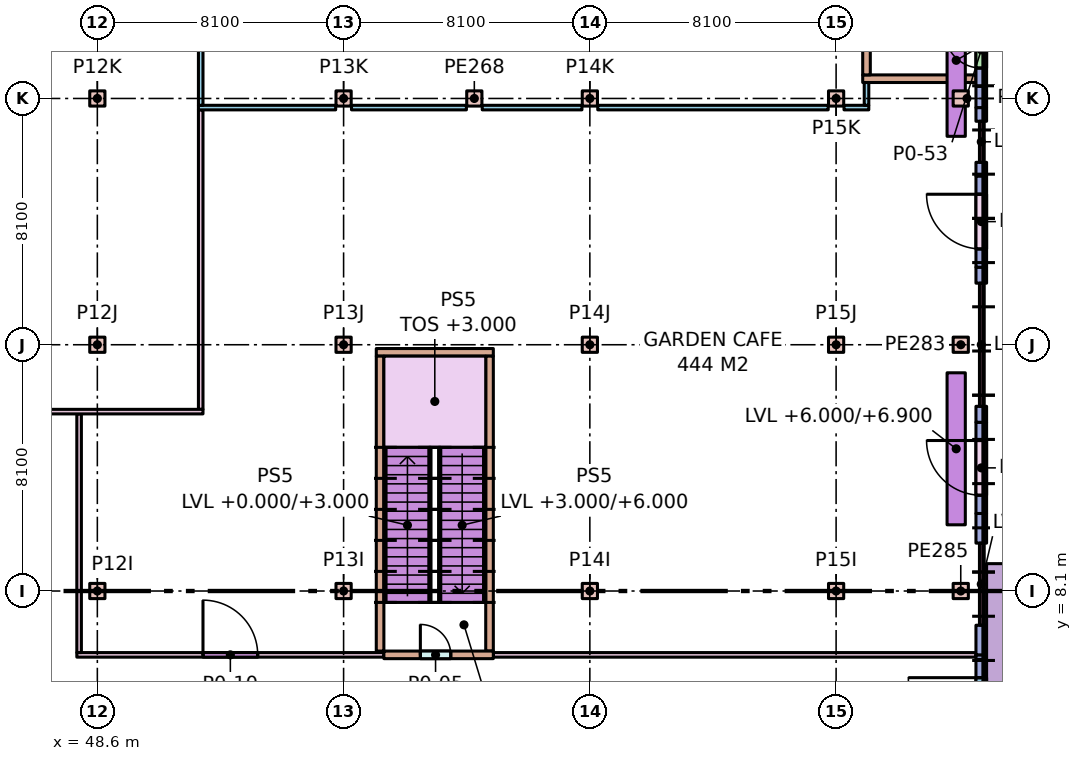
"""IFC4 building model, lengths in metres.
Left out: names, types, materials, properties, quantities, classifications, styles, units other than length and angle.
Written with IfcOpenShell. Run it as: python <this file> out.ifc"""

import sys

from ifc_helpers import new_model, si_unit, direction, frame, frame_2d, origin, origin_2d, place, context, subcontext, project, spatial, rectangle, extrude, element, fill, save


model = new_model("IFC4")
c1 = context("Model", 3, precision=1e-05, world=origin(), true_north=direction((0.0, 1.0)))
c2 = subcontext(c1, "Body", "Model", "MODEL_VIEW")
j1 = project(units=[si_unit("LENGTHUNIT", "METRE"), si_unit("PLANEANGLEUNIT", "RADIAN")], contexts=[c1])
p1 = place(None, origin())
s1 = spatial("IfcSite", under=j1, at=p1, CompositionType="ELEMENT")
p2 = place(p1, origin())
s2 = spatial("IfcBuilding", under=s1, at=p2, CompositionType="ELEMENT")
p3 = place(p2, origin())
s3 = spatial("IfcBuildingStorey", under=s2, at=p3, CompositionType="ELEMENT", Elevation=0.0)
for number, where, z_axis, x_axis in (
    (1, (48.6, 8.1, 0.0), (0.0, 0.0, 1.0), (1.0, 0.0, 0.0)),
    (2, (48.6, 16.2, 0.0), (0.0, 0.0, 1.0), (1.0, 0.0, 0.0)),
    (3, (48.6, 24.3, 0.0), (0.0, 0.0, 1.0), (1.0, 0.0, 0.0)),
    (4, (56.7, 8.1, 0.0), (0.0, 0.0, 1.0), (1.0, 0.0, 0.0)),
    (5, (56.7, 16.2, 0.0), (0.0, 0.0, 1.0), (1.0, 0.0, 0.0)),
    (6, (56.7, 24.3, 0.0), (0.0, 0.0, 1.0), (1.0, 0.0, 0.0)),
    (7, (64.8, 8.1, 0.0), (0.0, 0.0, 1.0), (1.0, 0.0, 0.0)),
    (8, (64.8, 16.2, 0.0), (0.0, 0.0, 1.0), (1.0, 0.0, 0.0)),
    (9, (64.8, 24.3, 0.0), (0.0, 0.0, 1.0), (1.0, 0.0, 0.0)),
    (10, (72.9, 8.1, 0.0), (0.0, 0.0, 1.0), (1.0, 0.0, 0.0)),
    (11, (72.9, 16.2, 0.0), (0.0, 0.0, 1.0), (1.0, 0.0, 0.0)),
    (12, (72.9, 24.3, 0.0), (0.0, 0.0, 1.0), (1.0, 0.0, 0.0)),
    (13, (61.0, 24.3, 0.0), (0.0, 0.0, 1.0), (1.0, 0.0, 0.0)),
    (14, (77.0, 16.2, 0.0), (0.0, 0.0, 1.0), (1.0, 0.0, 0.0)),
    (15, (77.0, 24.3, 0.0), (0.0, 0.0, 1.0), (1.0, 0.0, 0.0)),
    (16, (77.0, 8.1, 0.0), (0.0, 0.0, 1.0), (1.0, 0.0, 0.0)),
):
    element("IfcColumn", number, at=place(p3, frame(where, z_axis=z_axis, x_axis=x_axis)), inside=s3, PredefinedType="COLUMN", context=c2, shape_type="SweptSolid", body=[
        extrude(rectangle(XDim=0.5, YDim=0.5, at=origin_2d()), origin(), (0.0, 0.0, 1.0), 6.0),
    ])
p4 = place(p3, frame((77.675, 2.25, 0.0), z_axis=(0.0, 0.0, 1.0), x_axis=(0.0, 1.0, 0.0)))
e17 = element("IfcWall", 17, at=p4, inside=s3, PredefinedType="STANDARD", context=c2, shape_type="SweptSolid", body=[
    extrude(rectangle(XDim=3.6, YDim=0.35, at=frame_2d((1.8, 0.0))), origin(), (0.0, 0.0, 1.0), 5.68),
])
p5 = place(p4, frame((0.6, 0.0, 0.0)))
e18 = element("IfcOpeningElement", 18, at=p5, cuts=e17, PredefinedType="OPENING", context=c2, shape_type="SweptSolid", body=[
    extrude(rectangle(XDim=2.4, YDim=2.7, at=frame_2d((1.2, 1.35))), frame((0.0, 0.185, 0.0), z_axis=(0.0, -1.0, 0.0), x_axis=(1.0, 0.0, 0.0)), (0.0, 0.0, 1.0), 0.37),
])
p6 = place(p3, frame((77.675, 5.85, 0.0), z_axis=(0.0, 0.0, 1.0), x_axis=(0.0, 1.0, 0.0)))
e19 = element("IfcWall", 19, at=p6, inside=s3, PredefinedType="STANDARD", context=c2, shape_type="SweptSolid", body=[
    extrude(rectangle(XDim=0.15, YDim=0.35, at=frame_2d((0.075, 0.0))), origin(), (0.0, 0.0, 1.0), 5.68),
])
p7 = place(p3, frame((77.675, 6.0, 0.0), z_axis=(0.0, 0.0, 1.0), x_axis=(0.0, 1.0, 0.0)))
e20 = element("IfcWall", 20, at=p7, inside=s3, PredefinedType="STANDARD", context=c2, shape_type="SweptSolid", body=[
    extrude(rectangle(XDim=0.975, YDim=0.35, at=frame_2d((0.488, 0.0))), origin(), (0.0, 0.0, 1.0), 5.68),
])
p8 = place(p3, frame((77.675, 9.675, 0.0), z_axis=(0.0, 0.0, 1.0), x_axis=(0.0, 1.0, 0.0)))
e21 = element("IfcWall", 21, at=p8, inside=s3, PredefinedType="STANDARD", context=c2, shape_type="SweptSolid", body=[
    extrude(rectangle(XDim=0.975, YDim=0.35, at=frame_2d((0.487, 0.0))), origin(), (0.0, 0.0, 1.0), 5.68),
])
p9 = place(p3, frame((77.675, 10.65, 0.0), z_axis=(0.0, 0.0, 1.0), x_axis=(0.0, 1.0, 0.0)))
e22 = element("IfcWall", 22, at=p9, inside=s3, PredefinedType="STANDARD", context=c2, shape_type="SweptSolid", body=[
    extrude(rectangle(XDim=3.0, YDim=0.35, at=frame_2d((1.5, 0.0))), origin(), (0.0, 0.0, 1.0), 5.68),
])
p10 = place(p9, frame((0.6, 0.0, 0.0)))
e23 = element("IfcOpeningElement", 23, at=p10, cuts=e22, PredefinedType="OPENING", context=c2, shape_type="SweptSolid", body=[
    extrude(rectangle(XDim=1.8, YDim=2.7, at=frame_2d((0.9, 1.35))), frame((0.0, 0.185, 0.0), z_axis=(0.0, -1.0, 0.0), x_axis=(1.0, 0.0, 0.0)), (0.0, 0.0, 1.0), 0.37),
])
p11 = place(p3, frame((77.675, 13.65, 0.0), z_axis=(0.0, 0.0, 1.0), x_axis=(0.0, 1.0, 0.0)))
e24 = element("IfcWall", 24, at=p11, inside=s3, PredefinedType="STANDARD", context=c2, shape_type="SweptSolid", body=[
    extrude(rectangle(XDim=0.525, YDim=0.35, at=frame_2d((0.263, 0.0))), origin(), (0.0, 0.0, 1.0), 5.68),
])
p12 = place(p3, frame((77.675, 18.225, 0.0), z_axis=(0.0, 0.0, 1.0), x_axis=(0.0, 1.0, 0.0)))
e25 = element("IfcWall", 25, at=p12, inside=s3, PredefinedType="STANDARD", context=c2, shape_type="SweptSolid", body=[
    extrude(rectangle(XDim=0.525, YDim=0.35, at=frame_2d((0.262, 0.0))), origin(), (0.0, 0.0, 1.0), 5.68),
])
p13 = place(p3, frame((77.675, 18.75, 0.0), z_axis=(0.0, 0.0, 1.0), x_axis=(0.0, 1.0, 0.0)))
e26 = element("IfcWall", 26, at=p13, inside=s3, PredefinedType="STANDARD", context=c2, shape_type="SweptSolid", body=[
    extrude(rectangle(XDim=3.0, YDim=0.35, at=frame_2d((1.5, 0.0))), origin(), (0.0, 0.0, 1.0), 5.68),
])
p14 = place(p13, frame((0.6, 0.0, 0.0)))
e27 = element("IfcOpeningElement", 27, at=p14, cuts=e26, PredefinedType="OPENING", context=c2, shape_type="SweptSolid", body=[
    extrude(rectangle(XDim=1.8, YDim=2.7, at=frame_2d((0.9, 1.35))), frame((0.0, 0.185, 0.0), z_axis=(0.0, -1.0, 0.0), x_axis=(1.0, 0.0, 0.0)), (0.0, 0.0, 1.0), 0.37),
])
for number, where, z_axis, x_axis in (
    (28, (77.675, 21.75, 0.0), (0.0, 0.0, 1.0), (0.0, 1.0, 0.0)),
    (29, (77.675, 23.55, 0.0), (0.0, 0.0, 1.0), (0.0, 1.0, 0.0)),
):
    element("IfcWall", number, at=place(p3, frame(where, z_axis=z_axis, x_axis=x_axis)), inside=s3, PredefinedType="STANDARD", context=c2, shape_type="SweptSolid", body=[
        extrude(rectangle(XDim=0.45, YDim=0.35, at=frame_2d((0.225, 0.0))), origin(), (0.0, 0.0, 1.0), 5.68),
    ])
p15 = place(p3, frame((77.675, 24.0, 0.0), z_axis=(0.0, 0.0, 1.0), x_axis=(0.0, 1.0, 0.0)))
e30 = element("IfcWall", 30, at=p15, inside=s3, PredefinedType="STANDARD", context=c2, shape_type="SweptSolid", body=[
    extrude(rectangle(XDim=0.7, YDim=0.35, at=frame_2d((0.35, 0.0))), origin(), (0.0, 0.0, 1.0), 5.68),
])
p16 = place(p3, frame((77.675, 24.7, 0.0), z_axis=(0.0, 0.0, 1.0), x_axis=(0.0, 1.0, 0.0)))
e31 = element("IfcWall", 31, at=p16, inside=s3, PredefinedType="STANDARD", context=c2, shape_type="SweptSolid", body=[
    extrude(rectangle(XDim=2.4, YDim=0.35, at=frame_2d((1.2, 0.0))), origin(), (0.0, 0.0, 1.0), 5.68),
])
p17 = place(p16, frame((0.6, 0.0, 0.0)))
e32 = element("IfcOpeningElement", 32, at=p17, cuts=e31, PredefinedType="OPENING", context=c2, shape_type="SweptSolid", body=[
    extrude(rectangle(XDim=1.2, YDim=2.4, at=frame_2d((0.6, 1.2))), frame((0.0, 0.185, 0.0), z_axis=(0.0, -1.0, 0.0), x_axis=(1.0, 0.0, 0.0)), (0.0, 0.0, 1.0), 0.37),
])
for number, where, z_axis, x_axis in (
    (33, (76.85, 10.277, 6.0), (0.0, 0.0, 1.0), (0.0, 1.0, 0.0)),
    (34, (76.85, 23.055, 6.0), (0.0, 0.0, 1.0), (0.0, 1.0, 0.0)),
):
    element("IfcWall", number, at=place(p3, frame(where, z_axis=z_axis, x_axis=x_axis)), inside=s3, PredefinedType="PARAPET", context=c2, shape_type="SweptSolid", body=[
        extrude(rectangle(XDim=5.0, YDim=0.6, at=frame_2d((2.5, 0.0))), origin(), (0.0, 0.0, 1.0), 0.9),
    ])
p18 = place(p3, frame((73.775, 24.95, 0.0), z_axis=(0.0, 0.0, 1.0), x_axis=(1.0, 0.0, 0.0)))
e35 = element("IfcWall", 35, at=p18, inside=s3, PredefinedType="STANDARD", context=c2, shape_type="SweptSolid", body=[
    extrude(rectangle(XDim=3.725, YDim=0.25, at=frame_2d((1.863, 0.0))), origin(), (0.0, 0.0, 1.0), 5.68),
])
p19 = place(p3, frame((73.9, 25.075, 0.0), z_axis=(0.0, 0.0, 1.0), x_axis=(0.0, 1.0, 0.0)))
e36 = element("IfcWall", 36, at=p19, inside=s3, PredefinedType="STANDARD", context=c2, shape_type="SweptSolid", body=[
    extrude(rectangle(XDim=6.55, YDim=0.25, at=frame_2d((3.275, 0.0))), origin(), (0.0, 0.0, 1.0), 5.68),
])
p20 = place(p3, frame((51.925, 24.0, 0.0), z_axis=(0.0, 0.0, 1.0), x_axis=(1.0, 0.0, 0.0)))
e37 = element("IfcWall", 37, at=p20, inside=s3, PredefinedType="PARTITIONING", context=c2, shape_type="SweptSolid", body=[
    extrude(rectangle(XDim=4.515, YDim=0.15, at=frame_2d((2.257, 0.0))), origin(), (0.0, 0.0, 1.0), 5.68),
])
p21 = place(p3, frame((56.96, 24.0, 0.0), z_axis=(0.0, 0.0, 1.0), x_axis=(1.0, 0.0, 0.0)))
e38 = element("IfcWall", 38, at=p21, inside=s3, PredefinedType="PARTITIONING", context=c2, shape_type="SweptSolid", body=[
    extrude(rectangle(XDim=3.78, YDim=0.15, at=frame_2d((1.89, 0.0))), origin(), (0.0, 0.0, 1.0), 5.68),
])
p22 = place(p3, frame((61.26, 24.0, 0.0), z_axis=(0.0, 0.0, 1.0), x_axis=(1.0, 0.0, 0.0)))
e39 = element("IfcWall", 39, at=p22, inside=s3, PredefinedType="PARTITIONING", context=c2, shape_type="SweptSolid", body=[
    extrude(rectangle(XDim=3.28, YDim=0.15, at=frame_2d((1.64, 0.0))), origin(), (0.0, 0.0, 1.0), 5.68),
])
p23 = place(p3, frame((65.06, 24.0, 0.0), z_axis=(0.0, 0.0, 1.0), x_axis=(1.0, 0.0, 0.0)))
e40 = element("IfcWall", 40, at=p23, inside=s3, PredefinedType="PARTITIONING", context=c2, shape_type="SweptSolid", body=[
    extrude(rectangle(XDim=7.58, YDim=0.15, at=frame_2d((3.79, 0.0))), origin(), (0.0, 0.0, 1.0), 5.68),
])
p24 = place(p3, frame((73.16, 24.0, 0.0), z_axis=(0.0, 0.0, 1.0), x_axis=(1.0, 0.0, 0.0)))
e41 = element("IfcWall", 41, at=p24, inside=s3, PredefinedType="PARTITIONING", context=c2, shape_type="SweptSolid", body=[
    extrude(rectangle(XDim=0.815, YDim=0.15, at=frame_2d((0.408, 0.0))), origin(), (0.0, 0.0, 1.0), 5.68),
])
p25 = place(p3, frame((73.9, 24.075, 0.0), z_axis=(0.0, 0.0, 1.0), x_axis=(0.0, 1.0, 0.0)))
e42 = element("IfcWall", 42, at=p25, inside=s3, PredefinedType="PARTITIONING", context=c2, shape_type="SweptSolid", body=[
    extrude(rectangle(XDim=0.75, YDim=0.15, at=frame_2d((0.375, 0.0))), origin(), (0.0, 0.0, 1.0), 5.68),
])
p26 = place(p3, frame((47.925, 6.0, 0.0), z_axis=(0.0, 0.0, 1.0), x_axis=(1.0, 0.0, 0.0)))
e43 = element("IfcWall", 43, at=p26, inside=s3, PredefinedType="PARTITIONING", context=c2, shape_type="SweptSolid", body=[
    extrude(rectangle(XDim=10.1, YDim=0.15, at=frame_2d((5.05, 0.0))), origin(), (0.0, 0.0, 1.0), 5.68),
])
p27 = place(p26, frame((4.15, 0.0, 0.0)))
e44 = element("IfcOpeningElement", 44, at=p27, cuts=e43, PredefinedType="OPENING", context=c2, shape_type="SweptSolid", body=[
    extrude(rectangle(XDim=1.8, YDim=2.4, at=frame_2d((0.9, 1.2))), frame((0.0, 0.085, 0.0), z_axis=(0.0, -1.0, 0.0), x_axis=(1.0, 0.0, 0.0)), (0.0, 0.0, 1.0), 0.17),
])
p28 = place(p3, frame((61.625, 6.0, 0.0), z_axis=(0.0, 0.0, 1.0), x_axis=(1.0, 0.0, 0.0)))
e45 = element("IfcWall", 45, at=p28, inside=s3, PredefinedType="PARTITIONING", context=c2, shape_type="SweptSolid", body=[
    extrude(rectangle(XDim=15.875, YDim=0.15, at=frame_2d((7.938, 0.0))), origin(), (0.0, 0.0, 1.0), 5.68),
])
p29 = place(p3, frame((52.0, 14.075, 0.0), z_axis=(0.0, 0.0, 1.0), x_axis=(0.0, 1.0, 0.0)))
e46 = element("IfcWall", 46, at=p29, inside=s3, PredefinedType="PARTITIONING", context=c2, shape_type="SweptSolid", body=[
    extrude(rectangle(XDim=9.85, YDim=0.15, at=frame_2d((4.925, 0.0))), origin(), (0.0, 0.0, 1.0), 5.68),
])
p30 = place(p3, frame((48.0, 6.075, 0.0), z_axis=(0.0, 0.0, 1.0), x_axis=(0.0, 1.0, 0.0)))
e47 = element("IfcWall", 47, at=p30, inside=s3, PredefinedType="PARTITIONING", context=c2, shape_type="SweptSolid", body=[
    extrude(rectangle(XDim=7.85, YDim=0.15, at=frame_2d((3.925, 0.0))), origin(), (0.0, 0.0, 1.0), 5.68),
])
p31 = place(p3, frame((57.775, 15.95, 0.0), z_axis=(0.0, 0.0, 1.0), x_axis=(1.0, 0.0, 0.0)))
e48 = element("IfcWall", 48, at=p31, inside=s3, PredefinedType="STANDARD", context=c2, shape_type="SweptSolid", body=[
    extrude(rectangle(XDim=3.85, YDim=0.25, at=frame_2d((1.925, 0.0))), origin(), (0.0, 0.0, 1.0), 5.68),
])
for number, where, z_axis, x_axis in (
    (49, (57.9, 6.125, 0.0), (0.0, 0.0, 1.0), (0.0, 1.0, 0.0)),
    (50, (61.5, 6.125, 0.0), (0.0, 0.0, 1.0), (0.0, 1.0, 0.0)),
):
    element("IfcWall", number, at=place(p3, frame(where, z_axis=z_axis, x_axis=x_axis)), inside=s3, PredefinedType="STANDARD", context=c2, shape_type="SweptSolid", body=[
        extrude(rectangle(XDim=9.7, YDim=0.25, at=frame_2d((4.85, 0.0))), origin(), (0.0, 0.0, 1.0), 5.68),
    ])
p32 = place(p3, frame((52.0, 24.075, 0.0), z_axis=(0.0, 0.0, 1.0), x_axis=(0.0, 1.0, 0.0)))
e51 = element("IfcWall", 51, at=p32, inside=s3, PredefinedType="PARTITIONING", context=c2, shape_type="SweptSolid", body=[
    extrude(rectangle(XDim=5.85, YDim=0.15, at=frame_2d((2.925, 0.0))), origin(), (0.0, 0.0, 1.0), 5.68),
])
p33 = place(p3, frame((58.025, 6.0, 0.0), z_axis=(0.0, 0.0, 1.0), x_axis=(1.0, 0.0, 0.0)))
e52 = element("IfcWall", 52, at=p33, inside=s3, PredefinedType="STANDARD", context=c2, shape_type="SweptSolid", body=[
    extrude(rectangle(XDim=3.6, YDim=0.25, at=frame_2d((1.8, 0.0))), origin(), (0.0, 0.0, 1.0), 5.68),
])
p34 = place(p33, frame((1.2, 0.0, 0.0)))
e53 = element("IfcOpeningElement", 53, at=p34, cuts=e52, PredefinedType="OPENING", context=c2, shape_type="SweptSolid", body=[
    extrude(rectangle(XDim=1.0, YDim=2.1, at=frame_2d((0.5, 1.05))), frame((0.0, 0.135, 0.0), z_axis=(0.0, -1.0, 0.0), x_axis=(1.0, 0.0, 0.0)), (0.0, 0.0, 1.0), 0.27),
])
p35 = place(p3, frame((13.475, 14.0, 0.0), z_axis=(0.0, 0.0, 1.0), x_axis=(1.0, 0.0, 0.0)))
e54 = element("IfcWall", 54, at=p35, inside=s3, PredefinedType="PARTITIONING", context=c2, shape_type="SweptSolid", body=[
    extrude(rectangle(XDim=38.6, YDim=0.15, at=frame_2d((19.3, 0.0))), origin(), (0.0, 0.0, 1.0), 5.68),
])
p36 = place(p35, frame((22.875, 0.0, 0.0)))
e55 = element("IfcOpeningElement", 55, at=p36, cuts=e54, PredefinedType="OPENING", context=c2, shape_type="SweptSolid", body=[
    extrude(rectangle(XDim=1.8, YDim=2.4, at=frame_2d((0.9, 1.2))), frame((0.0, 0.085, 0.0), z_axis=(0.0, -1.0, 0.0), x_axis=(1.0, 0.0, 0.0)), (0.0, 0.0, 1.0), 0.17),
])
p37 = place(p34, origin())
e56 = element("IfcDoor", 56, at=p37, inside=s3, OperationType="SINGLE_SWING_LEFT", PredefinedType="DOOR", context=c2, shape_type="SweptSolid", body=[
    extrude(rectangle(XDim=1.0, YDim=2.1, at=frame_2d((0.5, 1.05))), frame((0.0, 0.025, 0.0), z_axis=(0.0, -1.0, 0.0), x_axis=(1.0, 0.0, 0.0)), (0.0, 0.0, 1.0), 0.05),
])
fill(e53, e56)
p38 = place(p27, origin())
e57 = element("IfcDoor", 57, at=p38, inside=s3, OperationType="SINGLE_SWING_LEFT", PredefinedType="DOOR", context=c2, shape_type="SweptSolid", body=[
    extrude(rectangle(XDim=1.8, YDim=2.4, at=frame_2d((0.9, 1.2))), frame((0.0, 0.025, 0.0), z_axis=(0.0, -1.0, 0.0), x_axis=(1.0, 0.0, 0.0)), (0.0, 0.0, 1.0), 0.05),
])
fill(e44, e57)
p39 = place(p5, frame((2.4, 0.0, 0.0), z_axis=(0.0, 0.0, 1.0), x_axis=(-1.0, 0.0, 0.0)))
e58 = element("IfcDoor", 58, at=p39, inside=s3, OperationType="SINGLE_SWING_RIGHT", PredefinedType="DOOR", context=c2, shape_type="SweptSolid", body=[
    extrude(rectangle(XDim=2.4, YDim=2.7, at=frame_2d((1.2, 1.35))), frame((0.0, 0.025, 0.0), z_axis=(0.0, -1.0, 0.0), x_axis=(1.0, 0.0, 0.0)), (0.0, 0.0, 1.0), 0.05),
])
fill(e18, e58)
p40 = place(p10, frame((1.8, 0.0, 0.0), z_axis=(0.0, 0.0, 1.0), x_axis=(-1.0, 0.0, 0.0)))
e59 = element("IfcDoor", 59, at=p40, inside=s3, OperationType="SINGLE_SWING_RIGHT", PredefinedType="DOOR", context=c2, shape_type="SweptSolid", body=[
    extrude(rectangle(XDim=1.8, YDim=2.7, at=frame_2d((0.9, 1.35))), frame((0.0, 0.025, 0.0), z_axis=(0.0, -1.0, 0.0), x_axis=(1.0, 0.0, 0.0)), (0.0, 0.0, 1.0), 0.05),
])
fill(e23, e59)
p41 = place(p14, frame((1.8, 0.0, 0.0), z_axis=(0.0, 0.0, 1.0), x_axis=(-1.0, 0.0, 0.0)))
e60 = element("IfcDoor", 60, at=p41, inside=s3, OperationType="SINGLE_SWING_RIGHT", PredefinedType="DOOR", context=c2, shape_type="SweptSolid", body=[
    extrude(rectangle(XDim=1.8, YDim=2.7, at=frame_2d((0.9, 1.35))), frame((0.0, 0.025, 0.0), z_axis=(0.0, -1.0, 0.0), x_axis=(1.0, 0.0, 0.0)), (0.0, 0.0, 1.0), 0.05),
])
fill(e27, e60)
p42 = place(p17, frame((1.2, 0.0, 0.0), z_axis=(0.0, 0.0, 1.0), x_axis=(-1.0, 0.0, 0.0)))
e61 = element("IfcDoor", 61, at=p42, inside=s3, OperationType="SINGLE_SWING_RIGHT", PredefinedType="DOOR", context=c2, shape_type="SweptSolid", body=[
    extrude(rectangle(XDim=1.2, YDim=2.4, at=frame_2d((0.6, 1.2))), frame((0.0, 0.025, 0.0), z_axis=(0.0, -1.0, 0.0), x_axis=(1.0, 0.0, 0.0)), (0.0, 0.0, 1.0), 0.05),
])
fill(e32, e61)
save(model, sys.argv[1])
